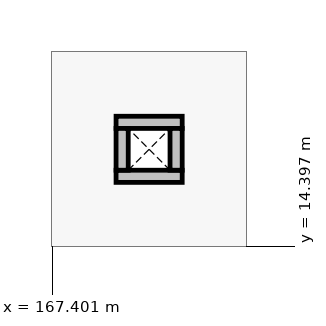
"""IFC4 building model, lengths in metres.
Left out: names, types, materials, properties, quantities, classifications, styles, units other than length and angle.
Written with IfcOpenShell. Run it as: python <this file> out.ifc"""

import sys

from ifc_helpers import new_model, si_unit, direction, frame, frame_2d, origin, place, context, subcontext, project, spatial, rectangle, extrude, element, save


model = new_model("IFC4")
c1 = context("Model", 3, precision=1e-05, world=origin(), true_north=direction((0.0, 1.0)))
c2 = subcontext(c1, "Body", "Model", "MODEL_VIEW")
j1 = project(units=[si_unit("LENGTHUNIT", "METRE"), si_unit("PLANEANGLEUNIT", "RADIAN")], contexts=[c1])
p1 = place(None, origin())
s1 = spatial("IfcSite", under=j1, at=p1, CompositionType="ELEMENT")
p2 = place(p1, origin())
s2 = spatial("IfcBuilding", under=s1, at=p2, CompositionType="ELEMENT")
p3 = place(p2, frame((0.0, 0.0, 4.8)))
s3 = spatial("IfcBuildingStorey", under=s2, at=p3, CompositionType="ELEMENT", Elevation=4.8)
for number, where, z_axis, x_axis in (
    (1, (168.24, 15.32, 0.0), (0.0, 0.0, 1.0), (1.0, 0.0, 0.0)),
    (2, (168.24, 16.03, 0.0), (0.0, 0.0, 1.0), (1.0, 0.0, 0.0)),
):
    element("IfcWall", number, at=place(p3, frame(where, z_axis=z_axis, x_axis=x_axis)), inside=s3, PredefinedType="PARTITIONING", context=c2, shape_type="SweptSolid", body=[
        extrude(rectangle(XDim=0.87, YDim=0.16, at=frame_2d((0.435, 0.0))), origin(), (0.0, 0.0, 1.0), 3.35),
    ])
for number, where, z_axis, x_axis in (
    (3, (168.32, 15.4, 0.0), (0.0, 0.0, 1.0), (0.0, 1.0, 0.0)),
    (4, (169.03, 15.4, 0.0), (0.0, 0.0, 1.0), (0.0, 1.0, 0.0)),
):
    element("IfcWall", number, at=place(p3, frame(where, z_axis=z_axis, x_axis=x_axis)), inside=s3, PredefinedType="PARTITIONING", context=c2, shape_type="SweptSolid", body=[
        extrude(rectangle(XDim=0.55, YDim=0.16, at=frame_2d((0.275, 0.0))), origin(), (0.0, 0.0, 1.0), 3.35),
    ])
save(model, sys.argv[1])
